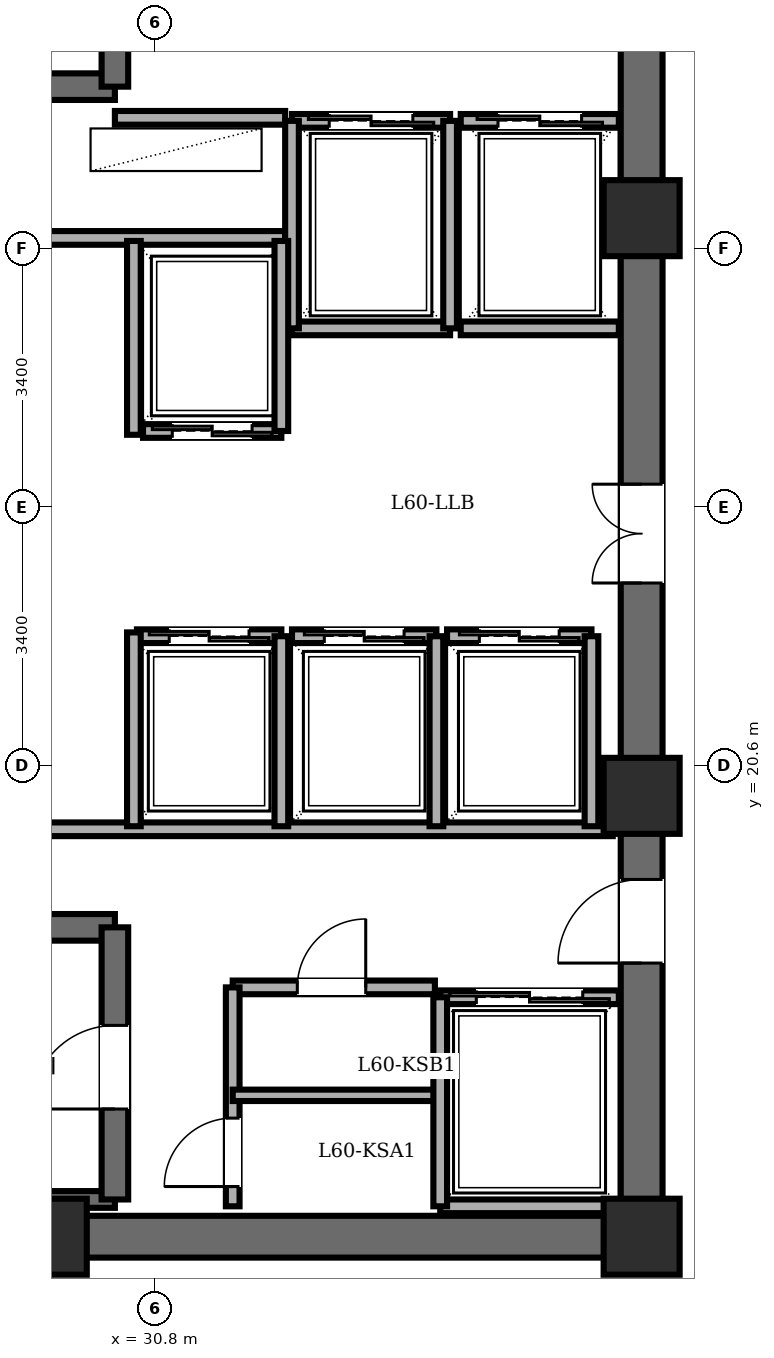
"""IFC4 building model, lengths in metres.
Left out: names, types, materials, properties, quantities, classifications, styles, units other than length and angle.
Written with IfcOpenShell. Run it as: python <this file> out.ifc"""

import sys

from ifc_helpers import new_model, si_unit, direction, frame, frame_2d, origin, origin_2d, place, context, subcontext, project, spatial, rectangle, extrude, element, fill, save


model = new_model("IFC4")
c1 = context("Model", 3, precision=1e-05, world=origin(), true_north=direction((0.0, 1.0)))
c2 = subcontext(c1, "Body", "Model", "MODEL_VIEW")
j1 = project(units=[si_unit("LENGTHUNIT", "METRE"), si_unit("PLANEANGLEUNIT", "RADIAN")], contexts=[c1])
p1 = place(None, origin())
s1 = spatial("IfcSite", under=j1, at=p1, CompositionType="ELEMENT")
p2 = place(p1, origin())
s2 = spatial("IfcBuilding", under=s1, at=p2, CompositionType="ELEMENT")
p3 = place(p2, frame((0.0, 0.0, 230.1)))
s3 = spatial("IfcBuildingStorey", under=s2, at=p3, CompositionType="ELEMENT", Elevation=230.1)
for number, where, z_axis, x_axis in (
    (1, (29.4, 14.4, 0.0), (0.0, 0.0, 1.0), (1.0, 0.0, 0.0)),
    (2, (37.2, 14.4, 0.0), (0.0, 0.0, 1.0), (1.0, 0.0, 0.0)),
    (3, (37.2, 20.2, 0.0), (0.0, 0.0, 1.0), (1.0, 0.0, 0.0)),
    (4, (37.2, 27.8, 0.0), (0.0, 0.0, 1.0), (1.0, 0.0, 0.0)),
):
    element("IfcColumn", number, at=place(p3, frame(where, z_axis=z_axis, x_axis=x_axis)), inside=s3, PredefinedType="COLUMN", context=c2, shape_type="SweptSolid", body=[
        extrude(rectangle(XDim=1.0, YDim=1.0, at=origin_2d()), origin(), (0.0, 0.0, 1.0), 3.6),
    ])
p4 = place(p3, frame((37.2, 14.4, 0.0), z_axis=(0.0, 0.0, 1.0), x_axis=(-1.0, 0.0, 0.0)))
e5 = element("IfcWall", 5, at=p4, inside=s3, PredefinedType="SHEAR", context=c2, shape_type="SweptSolid", body=[
    extrude(rectangle(XDim=15.6, YDim=0.55, at=frame_2d((7.8, 0.0))), origin(), (0.0, 0.0, 1.0), 3.4),
])
p5 = place(p3, frame((37.2, 14.4, 0.0), z_axis=(0.0, 0.0, 1.0), x_axis=(0.0, 1.0, 0.0)))
e6 = element("IfcWall", 6, at=p5, inside=s3, PredefinedType="SHEAR", context=c2, shape_type="SweptSolid", body=[
    extrude(rectangle(XDim=19.2, YDim=0.55, at=frame_2d((9.6, 0.0))), origin(), (0.0, 0.0, 1.0), 3.4),
])
p6 = place(p5, frame((15.8, 0.0, 0.0)))
e7 = element("IfcOpeningElement", 7, at=p6, cuts=e6, PredefinedType="OPENING", context=c2, shape_type="SweptSolid", body=[
    extrude(rectangle(XDim=1.15, YDim=2.15, at=frame_2d((0.575, 1.075))), frame((0.0, 0.285, 0.0), z_axis=(0.0, -1.0, 0.0), x_axis=(1.0, 0.0, 0.0)), (0.0, 0.0, 1.0), 0.57),
])
p7 = place(p5, frame((3.6, 0.0, 0.0)))
e8 = element("IfcOpeningElement", 8, at=p7, cuts=e6, PredefinedType="OPENING", context=c2, shape_type="SweptSolid", body=[
    extrude(rectangle(XDim=1.1, YDim=2.15, at=frame_2d((0.55, 1.075))), frame((0.0, 0.285, 0.0), z_axis=(0.0, -1.0, 0.0), x_axis=(1.0, 0.0, 0.0)), (0.0, 0.0, 1.0), 0.57),
])
p8 = place(p5, frame((8.6, 0.0, 0.0)))
e9 = element("IfcOpeningElement", 9, at=p8, cuts=e6, PredefinedType="OPENING", context=c2, shape_type="SweptSolid", body=[
    extrude(rectangle(XDim=1.3, YDim=2.2, at=frame_2d((0.65, 1.1))), frame((0.0, 0.285, 0.0), z_axis=(0.0, -1.0, 0.0), x_axis=(1.0, 0.0, 0.0)), (0.0, 0.0, 1.0), 0.57),
])
p9 = place(p3, frame((22.48, 29.53, 0.0), z_axis=(0.0, 0.0, 1.0), x_axis=(1.0, 0.0, 0.0)))
e10 = element("IfcWall", 10, at=p9, inside=s3, PredefinedType="SOLIDWALL", context=c2, shape_type="SweptSolid", body=[
    extrude(rectangle(XDim=7.79, YDim=0.35, at=frame_2d((3.895, 0.0))), origin(), (0.0, 0.0, 1.0), 3.4),
])
p10 = place(p3, frame((30.27, 29.53, 0.0), z_axis=(0.0, 0.0, 1.0), x_axis=(0.0, 1.0, 0.0)))
e11 = element("IfcWall", 11, at=p10, inside=s3, PredefinedType="SOLIDWALL", context=c2, shape_type="SweptSolid", body=[
    extrude(rectangle(XDim=3.58, YDim=0.35, at=frame_2d((1.79, 0.0))), origin(), (0.0, 0.0, 1.0), 3.4),
])
p11 = place(p10, frame((1.25, 0.0, 0.0)))
e12 = element("IfcOpeningElement", 12, at=p11, cuts=e11, PredefinedType="OPENING", context=c2, shape_type="SweptSolid", body=[
    extrude(rectangle(XDim=1.1, YDim=2.15, at=frame_2d((0.55, 1.075))), frame((0.0, 0.185, 0.0), z_axis=(0.0, -1.0, 0.0), x_axis=(1.0, 0.0, 0.0)), (0.0, 0.0, 1.0), 0.37),
])
p12 = place(p3, frame((22.48, 18.47, 0.0), z_axis=(0.0, 0.0, 1.0), x_axis=(1.0, 0.0, 0.0)))
e13 = element("IfcWall", 13, at=p12, inside=s3, PredefinedType="SOLIDWALL", context=c2, shape_type="SweptSolid", body=[
    extrude(rectangle(XDim=7.79, YDim=0.35, at=frame_2d((3.895, 0.0))), origin(), (0.0, 0.0, 1.0), 3.4),
])
p13 = place(p3, frame((22.48, 14.89, 0.0), z_axis=(0.0, 0.0, 1.0), x_axis=(1.0, 0.0, 0.0)))
e14 = element("IfcWall", 14, at=p13, inside=s3, PredefinedType="PARTITIONING", context=c2, shape_type="SweptSolid", body=[
    extrude(rectangle(XDim=7.79, YDim=0.22, at=frame_2d((3.895, 0.0))), origin(), (0.0, 0.0, 1.0), 3.4),
])
p14 = place(p3, frame((30.27, 14.89, 0.0), z_axis=(0.0, 0.0, 1.0), x_axis=(0.0, 1.0, 0.0)))
e15 = element("IfcWall", 15, at=p14, inside=s3, PredefinedType="SOLIDWALL", context=c2, shape_type="SweptSolid", body=[
    extrude(rectangle(XDim=3.58, YDim=0.35, at=frame_2d((1.79, 0.0))), origin(), (0.0, 0.0, 1.0), 3.4),
])
p15 = place(p14, frame((1.19, 0.0, 0.0)))
e16 = element("IfcOpeningElement", 16, at=p15, cuts=e15, PredefinedType="OPENING", context=c2, shape_type="SweptSolid", body=[
    extrude(rectangle(XDim=1.1, YDim=2.15, at=frame_2d((0.55, 1.075))), frame((0.0, 0.185, 0.0), z_axis=(0.0, -1.0, 0.0), x_axis=(1.0, 0.0, 0.0)), (0.0, 0.0, 1.0), 0.37),
])
p16 = place(p3, frame((30.27, 29.12, 0.0), z_axis=(0.0, 0.0, 1.0), x_axis=(1.0, 0.0, 0.0)))
e17 = element("IfcWall", 17, at=p16, inside=s3, PredefinedType="PARTITIONING", context=c2, shape_type="SweptSolid", body=[
    extrude(rectangle(XDim=2.24, YDim=0.18, at=frame_2d((1.12, 0.0))), origin(), (0.0, 0.0, 1.0), 3.4),
])
p17 = place(p3, frame((21.95, 27.54, 0.0), z_axis=(0.0, 0.0, 1.0), x_axis=(1.0, 0.0, 0.0)))
e18 = element("IfcWall", 18, at=p17, inside=s3, PredefinedType="PARTITIONING", context=c2, shape_type="SweptSolid", body=[
    extrude(rectangle(XDim=10.56, YDim=0.18, at=frame_2d((5.28, 0.0))), origin(), (0.0, 0.0, 1.0), 3.4),
])
p18 = place(p3, frame((21.95, 19.76, 0.0), z_axis=(0.0, 0.0, 1.0), x_axis=(1.0, 0.0, 0.0)))
e19 = element("IfcWall", 19, at=p18, inside=s3, PredefinedType="PARTITIONING", context=c2, shape_type="SweptSolid", body=[
    extrude(rectangle(XDim=14.87, YDim=0.18, at=frame_2d((7.435, 0.0))), origin(), (0.0, 0.0, 1.0), 3.4),
])
p19 = place(p3, frame((31.82, 17.68, 0.0), z_axis=(0.0, 0.0, 1.0), x_axis=(1.0, 0.0, 0.0)))
e20 = element("IfcWall", 20, at=p19, inside=s3, PredefinedType="PARTITIONING", context=c2, shape_type="SweptSolid", body=[
    extrude(rectangle(XDim=2.66, YDim=0.18, at=frame_2d((1.33, 0.0))), origin(), (0.0, 0.0, 1.0), 3.4),
])
p20 = place(p19, frame((0.85, 0.0, 0.0)))
e21 = element("IfcOpeningElement", 21, at=p20, cuts=e20, PredefinedType="OPENING", context=c2, shape_type="SweptSolid", body=[
    extrude(rectangle(XDim=0.9, YDim=2.05, at=frame_2d((0.45, 1.025))), frame((0.0, 0.1, 0.0), z_axis=(0.0, -1.0, 0.0), x_axis=(1.0, 0.0, 0.0)), (0.0, 0.0, 1.0), 0.2),
])
p21 = place(p3, frame((31.82, 14.8, 0.0), z_axis=(0.0, 0.0, 1.0), x_axis=(0.0, 1.0, 0.0)))
e22 = element("IfcWall", 22, at=p21, inside=s3, PredefinedType="PARTITIONING", context=c2, shape_type="SweptSolid", body=[
    extrude(rectangle(XDim=2.88, YDim=0.18, at=frame_2d((1.44, 0.0))), origin(), (0.0, 0.0, 1.0), 3.4),
])
p22 = place(p21, frame((0.26, 0.0, 0.0)))
e23 = element("IfcOpeningElement", 23, at=p22, cuts=e22, PredefinedType="OPENING", context=c2, shape_type="SweptSolid", body=[
    extrude(rectangle(XDim=0.9, YDim=2.05, at=frame_2d((0.45, 1.025))), frame((0.0, 0.1, 0.0), z_axis=(0.0, -1.0, 0.0), x_axis=(1.0, 0.0, 0.0)), (0.0, 0.0, 1.0), 0.2),
])
p23 = place(p3, frame((31.82, 16.26, 0.0), z_axis=(0.0, 0.0, 1.0), x_axis=(1.0, 0.0, 0.0)))
e24 = element("IfcWall", 24, at=p23, inside=s3, PredefinedType="PARTITIONING", context=c2, shape_type="SweptSolid", body=[
    extrude(rectangle(XDim=2.66, YDim=0.15, at=frame_2d((1.33, 0.0))), origin(), (0.0, 0.0, 1.0), 3.4),
])
p24 = place(p3, frame((32.6, 29.08, 0.0), z_axis=(0.0, 0.0, 1.0), x_axis=(1.0, 0.0, 0.0)))
e25 = element("IfcWall", 25, at=p24, inside=s3, PredefinedType="PARTITIONING", context=c2, shape_type="SweptSolid", body=[
    extrude(rectangle(XDim=2.08, YDim=0.18, at=frame_2d((1.04, 0.0))), origin(), (0.0, 0.0, 1.0), 3.4),
])
p25 = place(p24, frame((0.49, 0.0, 0.0)))
e26 = element("IfcOpeningElement", 26, at=p25, cuts=e25, PredefinedType="OPENING", context=c2, shape_type="SweptSolid", body=[
    extrude(rectangle(XDim=1.1, YDim=2.2, at=frame_2d((0.55, 1.1))), frame((0.0, 0.1, 0.0), z_axis=(0.0, -1.0, 0.0), x_axis=(1.0, 0.0, 0.0)), (0.0, 0.0, 1.0), 0.2),
])
p26 = place(p3, frame((34.68, 26.35, 0.0), z_axis=(0.0, 0.0, 1.0), x_axis=(-1.0, 0.0, 0.0)))
e27 = element("IfcWall", 27, at=p26, inside=s3, PredefinedType="PARTITIONING", context=c2, shape_type="SweptSolid", body=[
    extrude(rectangle(XDim=2.08, YDim=0.18, at=frame_2d((1.04, 0.0))), origin(), (0.0, 0.0, 1.0), 3.4),
])
for number, where, z_axis, x_axis in (
    (28, (34.68, 26.35, 0.0), (0.0, 0.0, 1.0), (0.0, 1.0, 0.0)),
    (29, (32.6, 29.08, 0.0), (0.0, 0.0, 1.0), (0.0, -1.0, 0.0)),
):
    element("IfcWall", number, at=place(p3, frame(where, z_axis=z_axis, x_axis=x_axis)), inside=s3, PredefinedType="PARTITIONING", context=c2, shape_type="SweptSolid", body=[
        extrude(rectangle(XDim=2.73, YDim=0.18, at=frame_2d((1.365, 0.0))), origin(), (0.0, 0.0, 1.0), 3.4),
    ])
p27 = place(p3, frame((34.82, 29.08, 0.0), z_axis=(0.0, 0.0, 1.0), x_axis=(1.0, 0.0, 0.0)))
e30 = element("IfcWall", 30, at=p27, inside=s3, PredefinedType="PARTITIONING", context=c2, shape_type="SweptSolid", body=[
    extrude(rectangle(XDim=2.08, YDim=0.18, at=frame_2d((1.04, 0.0))), origin(), (0.0, 0.0, 1.0), 3.4),
])
p28 = place(p27, frame((0.49, 0.0, 0.0)))
e31 = element("IfcOpeningElement", 31, at=p28, cuts=e30, PredefinedType="OPENING", context=c2, shape_type="SweptSolid", body=[
    extrude(rectangle(XDim=1.1, YDim=2.2, at=frame_2d((0.55, 1.1))), frame((0.0, 0.1, 0.0), z_axis=(0.0, -1.0, 0.0), x_axis=(1.0, 0.0, 0.0)), (0.0, 0.0, 1.0), 0.2),
])
p29 = place(p3, frame((36.9, 26.35, 0.0), z_axis=(0.0, 0.0, 1.0), x_axis=(-1.0, 0.0, 0.0)))
e32 = element("IfcWall", 32, at=p29, inside=s3, PredefinedType="PARTITIONING", context=c2, shape_type="SweptSolid", body=[
    extrude(rectangle(XDim=2.08, YDim=0.18, at=frame_2d((1.04, 0.0))), origin(), (0.0, 0.0, 1.0), 3.4),
])
p30 = place(p3, frame((34.55, 17.55, 0.0), z_axis=(0.0, 0.0, 1.0), x_axis=(1.0, 0.0, 0.0)))
e33 = element("IfcWall", 33, at=p30, inside=s3, PredefinedType="PARTITIONING", context=c2, shape_type="SweptSolid", body=[
    extrude(rectangle(XDim=2.35, YDim=0.18, at=frame_2d((1.175, 0.0))), origin(), (0.0, 0.0, 1.0), 3.4),
])
p31 = place(p30, frame((0.475, 0.0, 0.0)))
e34 = element("IfcOpeningElement", 34, at=p31, cuts=e33, PredefinedType="OPENING", context=c2, shape_type="SweptSolid", body=[
    extrude(rectangle(XDim=1.4, YDim=2.3, at=frame_2d((0.7, 1.15))), frame((0.0, 0.1, 0.0), z_axis=(0.0, -1.0, 0.0), x_axis=(1.0, 0.0, 0.0)), (0.0, 0.0, 1.0), 0.2),
])
p32 = place(p3, frame((36.9, 14.8, 0.0), z_axis=(0.0, 0.0, 1.0), x_axis=(-1.0, 0.0, 0.0)))
e35 = element("IfcWall", 35, at=p32, inside=s3, PredefinedType="PARTITIONING", context=c2, shape_type="SweptSolid", body=[
    extrude(rectangle(XDim=2.35, YDim=0.18, at=frame_2d((1.175, 0.0))), origin(), (0.0, 0.0, 1.0), 3.4),
])
p33 = place(p3, frame((34.55, 17.55, 0.0), z_axis=(0.0, 0.0, 1.0), x_axis=(0.0, -1.0, 0.0)))
e36 = element("IfcWall", 36, at=p33, inside=s3, PredefinedType="PARTITIONING", context=c2, shape_type="SweptSolid", body=[
    extrude(rectangle(XDim=2.75, YDim=0.18, at=frame_2d((1.375, 0.0))), origin(), (0.0, 0.0, 1.0), 3.4),
])
p34 = place(p3, frame((32.46, 25.0, 0.0), z_axis=(0.0, 0.0, 1.0), x_axis=(-1.0, 0.0, 0.0)))
e37 = element("IfcWall", 37, at=p34, inside=s3, PredefinedType="PARTITIONING", context=c2, shape_type="SweptSolid", body=[
    extrude(rectangle(XDim=1.82, YDim=0.18, at=frame_2d((0.91, 0.0))), origin(), (0.0, 0.0, 1.0), 3.4),
])
p35 = place(p34, frame((0.385, 0.0, 0.0)))
e38 = element("IfcOpeningElement", 38, at=p35, cuts=e37, PredefinedType="OPENING", context=c2, shape_type="SweptSolid", body=[
    extrude(rectangle(XDim=1.05, YDim=2.2, at=frame_2d((0.525, 1.1))), frame((0.0, 0.1, 0.0), z_axis=(0.0, -1.0, 0.0), x_axis=(1.0, 0.0, 0.0)), (0.0, 0.0, 1.0), 0.2),
])
p36 = place(p3, frame((32.46, 25.0, 0.0), z_axis=(0.0, 0.0, 1.0), x_axis=(0.0, 1.0, 0.0)))
e39 = element("IfcWall", 39, at=p36, inside=s3, PredefinedType="PARTITIONING", context=c2, shape_type="SweptSolid", body=[
    extrude(rectangle(XDim=2.5, YDim=0.18, at=frame_2d((1.25, 0.0))), origin(), (0.0, 0.0, 1.0), 3.4),
])
p37 = place(p3, frame((30.56, 22.3, 0.0), z_axis=(0.0, 0.0, 1.0), x_axis=(1.0, 0.0, 0.0)))
e40 = element("IfcWall", 40, at=p37, inside=s3, PredefinedType="PARTITIONING", context=c2, shape_type="SweptSolid", body=[
    extrude(rectangle(XDim=1.9, YDim=0.18, at=frame_2d((0.95, 0.0))), origin(), (0.0, 0.0, 1.0), 3.4),
])
p38 = place(p37, frame((0.425, 0.0, 0.0)))
e41 = element("IfcOpeningElement", 41, at=p38, cuts=e40, PredefinedType="OPENING", context=c2, shape_type="SweptSolid", body=[
    extrude(rectangle(XDim=1.05, YDim=2.2, at=frame_2d((0.525, 1.1))), frame((0.0, 0.1, 0.0), z_axis=(0.0, -1.0, 0.0), x_axis=(1.0, 0.0, 0.0)), (0.0, 0.0, 1.0), 0.2),
])
p39 = place(p3, frame((32.46, 19.8, 0.0), z_axis=(0.0, 0.0, 1.0), x_axis=(0.0, 1.0, 0.0)))
e42 = element("IfcWall", 42, at=p39, inside=s3, PredefinedType="PARTITIONING", context=c2, shape_type="SweptSolid", body=[
    extrude(rectangle(XDim=2.5, YDim=0.18, at=frame_2d((1.25, 0.0))), origin(), (0.0, 0.0, 1.0), 3.4),
])
p40 = place(p3, frame((32.6, 22.3, 0.0), z_axis=(0.0, 0.0, 1.0), x_axis=(1.0, 0.0, 0.0)))
e43 = element("IfcWall", 43, at=p40, inside=s3, PredefinedType="PARTITIONING", context=c2, shape_type="SweptSolid", body=[
    extrude(rectangle(XDim=1.9, YDim=0.18, at=frame_2d((0.95, 0.0))), origin(), (0.0, 0.0, 1.0), 3.4),
])
p41 = place(p40, frame((0.425, 0.0, 0.0)))
e44 = element("IfcOpeningElement", 44, at=p41, cuts=e43, PredefinedType="OPENING", context=c2, shape_type="SweptSolid", body=[
    extrude(rectangle(XDim=1.05, YDim=2.2, at=frame_2d((0.525, 1.1))), frame((0.0, 0.1, 0.0), z_axis=(0.0, -1.0, 0.0), x_axis=(1.0, 0.0, 0.0)), (0.0, 0.0, 1.0), 0.2),
])
p42 = place(p3, frame((34.5, 19.8, 0.0), z_axis=(0.0, 0.0, 1.0), x_axis=(0.0, 1.0, 0.0)))
e45 = element("IfcWall", 45, at=p42, inside=s3, PredefinedType="PARTITIONING", context=c2, shape_type="SweptSolid", body=[
    extrude(rectangle(XDim=2.5, YDim=0.18, at=frame_2d((1.25, 0.0))), origin(), (0.0, 0.0, 1.0), 3.4),
])
p43 = place(p3, frame((34.64, 22.3, 0.0), z_axis=(0.0, 0.0, 1.0), x_axis=(1.0, 0.0, 0.0)))
e46 = element("IfcWall", 46, at=p43, inside=s3, PredefinedType="PARTITIONING", context=c2, shape_type="SweptSolid", body=[
    extrude(rectangle(XDim=1.9, YDim=0.18, at=frame_2d((0.95, 0.0))), origin(), (0.0, 0.0, 1.0), 3.4),
])
p44 = place(p43, frame((0.425, 0.0, 0.0)))
e47 = element("IfcOpeningElement", 47, at=p44, cuts=e46, PredefinedType="OPENING", context=c2, shape_type="SweptSolid", body=[
    extrude(rectangle(XDim=1.05, YDim=2.2, at=frame_2d((0.525, 1.1))), frame((0.0, 0.1, 0.0), z_axis=(0.0, -1.0, 0.0), x_axis=(1.0, 0.0, 0.0)), (0.0, 0.0, 1.0), 0.2),
])
p45 = place(p3, frame((36.54, 19.8, 0.0), z_axis=(0.0, 0.0, 1.0), x_axis=(0.0, 1.0, 0.0)))
e48 = element("IfcWall", 48, at=p45, inside=s3, PredefinedType="PARTITIONING", context=c2, shape_type="SweptSolid", body=[
    extrude(rectangle(XDim=2.5, YDim=0.18, at=frame_2d((1.25, 0.0))), origin(), (0.0, 0.0, 1.0), 3.4),
])
for number, where, z_axis, x_axis in (
    (49, (30.52, 24.95, 0.0), (0.0, 0.0, 1.0), (0.0, 1.0, 0.0)),
    (50, (30.52, 19.8, 0.0), (0.0, 0.0, 1.0), (0.0, 1.0, 0.0)),
):
    element("IfcWall", number, at=place(p3, frame(where, z_axis=z_axis, x_axis=x_axis)), inside=s3, PredefinedType="PARTITIONING", context=c2, shape_type="SweptSolid", body=[
        extrude(rectangle(XDim=2.55, YDim=0.18, at=frame_2d((1.275, 0.0))), origin(), (0.0, 0.0, 1.0), 3.4),
    ])
p46 = place(p15, origin())
e51 = element("IfcDoor", 51, at=p46, inside=s3, OperationType="SINGLE_SWING_LEFT", PredefinedType="DOOR", context=c2, shape_type="SweptSolid", body=[
    extrude(rectangle(XDim=1.1, YDim=2.15, at=frame_2d((0.55, 1.075))), frame((0.0, 0.025, 0.0), z_axis=(0.0, -1.0, 0.0), x_axis=(1.0, 0.0, 0.0)), (0.0, 0.0, 1.0), 0.05),
])
fill(e16, e51)
p47 = place(p7, origin())
e52 = element("IfcDoor", 52, at=p47, inside=s3, OperationType="SINGLE_SWING_LEFT", PredefinedType="DOOR", context=c2, shape_type="SweptSolid", body=[
    extrude(rectangle(XDim=1.1, YDim=2.15, at=frame_2d((0.55, 1.075))), frame((0.0, 0.025, 0.0), z_axis=(0.0, -1.0, 0.0), x_axis=(1.0, 0.0, 0.0)), (0.0, 0.0, 1.0), 0.05),
])
fill(e8, e52)
p48 = place(p20, origin())
e53 = element("IfcDoor", 53, at=p48, inside=s3, OperationType="SINGLE_SWING_RIGHT", PredefinedType="DOOR", context=c2, shape_type="SweptSolid", body=[
    extrude(rectangle(XDim=0.9, YDim=2.05, at=frame_2d((0.45, 1.025))), frame((0.0, 0.025, 0.0), z_axis=(0.0, -1.0, 0.0), x_axis=(1.0, 0.0, 0.0)), (0.0, 0.0, 1.0), 0.05),
])
fill(e21, e53)
p49 = place(p22, origin())
e54 = element("IfcDoor", 54, at=p49, inside=s3, OperationType="SINGLE_SWING_LEFT", PredefinedType="DOOR", context=c2, shape_type="SweptSolid", body=[
    extrude(rectangle(XDim=0.9, YDim=2.05, at=frame_2d((0.45, 1.025))), frame((0.0, 0.025, 0.0), z_axis=(0.0, -1.0, 0.0), x_axis=(1.0, 0.0, 0.0)), (0.0, 0.0, 1.0), 0.05),
])
fill(e23, e54)
p50 = place(p25, origin())
e55 = element("IfcDoor", 55, at=p50, inside=s3, OperationType="DOUBLE_DOOR_SLIDING", PredefinedType="DOOR", context=c2, shape_type="SweptSolid", body=[
    extrude(rectangle(XDim=1.1, YDim=2.2, at=frame_2d((0.55, 1.1))), frame((0.0, 0.025, 0.0), z_axis=(0.0, -1.0, 0.0), x_axis=(1.0, 0.0, 0.0)), (0.0, 0.0, 1.0), 0.05),
])
fill(e26, e55)
p51 = place(p28, origin())
e56 = element("IfcDoor", 56, at=p51, inside=s3, OperationType="DOUBLE_DOOR_SLIDING", PredefinedType="DOOR", context=c2, shape_type="SweptSolid", body=[
    extrude(rectangle(XDim=1.1, YDim=2.2, at=frame_2d((0.55, 1.1))), frame((0.0, 0.025, 0.0), z_axis=(0.0, -1.0, 0.0), x_axis=(1.0, 0.0, 0.0)), (0.0, 0.0, 1.0), 0.05),
])
fill(e31, e56)
p52 = place(p31, origin())
e57 = element("IfcDoor", 57, at=p52, inside=s3, OperationType="DOUBLE_DOOR_SLIDING", PredefinedType="DOOR", context=c2, shape_type="SweptSolid", body=[
    extrude(rectangle(XDim=1.4, YDim=2.3, at=frame_2d((0.7, 1.15))), frame((0.0, 0.025, 0.0), z_axis=(0.0, -1.0, 0.0), x_axis=(1.0, 0.0, 0.0)), (0.0, 0.0, 1.0), 0.05),
])
fill(e34, e57)
p53 = place(p35, origin())
e58 = element("IfcDoor", 58, at=p53, inside=s3, OperationType="DOUBLE_DOOR_SLIDING", PredefinedType="DOOR", context=c2, shape_type="SweptSolid", body=[
    extrude(rectangle(XDim=1.05, YDim=2.2, at=frame_2d((0.525, 1.1))), frame((0.0, 0.025, 0.0), z_axis=(0.0, -1.0, 0.0), x_axis=(1.0, 0.0, 0.0)), (0.0, 0.0, 1.0), 0.05),
])
fill(e38, e58)
p54 = place(p38, origin())
e59 = element("IfcDoor", 59, at=p54, inside=s3, OperationType="DOUBLE_DOOR_SLIDING", PredefinedType="DOOR", context=c2, shape_type="SweptSolid", body=[
    extrude(rectangle(XDim=1.05, YDim=2.2, at=frame_2d((0.525, 1.1))), frame((0.0, 0.025, 0.0), z_axis=(0.0, -1.0, 0.0), x_axis=(1.0, 0.0, 0.0)), (0.0, 0.0, 1.0), 0.05),
])
fill(e41, e59)
p55 = place(p41, origin())
e60 = element("IfcDoor", 60, at=p55, inside=s3, OperationType="DOUBLE_DOOR_SLIDING", PredefinedType="DOOR", context=c2, shape_type="SweptSolid", body=[
    extrude(rectangle(XDim=1.05, YDim=2.2, at=frame_2d((0.525, 1.1))), frame((0.0, 0.025, 0.0), z_axis=(0.0, -1.0, 0.0), x_axis=(1.0, 0.0, 0.0)), (0.0, 0.0, 1.0), 0.05),
])
fill(e44, e60)
p56 = place(p44, origin())
e61 = element("IfcDoor", 61, at=p56, inside=s3, OperationType="DOUBLE_DOOR_SLIDING", PredefinedType="DOOR", context=c2, shape_type="SweptSolid", body=[
    extrude(rectangle(XDim=1.05, YDim=2.2, at=frame_2d((0.525, 1.1))), frame((0.0, 0.025, 0.0), z_axis=(0.0, -1.0, 0.0), x_axis=(1.0, 0.0, 0.0)), (0.0, 0.0, 1.0), 0.05),
])
fill(e47, e61)
p57 = place(p8, origin())
e62 = element("IfcDoor", 62, at=p57, inside=s3, OperationType="DOUBLE_DOOR_SINGLE_SWING", PredefinedType="DOOR", context=c2, shape_type="SweptSolid", body=[
    extrude(rectangle(XDim=1.3, YDim=2.2, at=frame_2d((0.65, 1.1))), frame((0.0, 0.025, 0.0), z_axis=(0.0, -1.0, 0.0), x_axis=(1.0, 0.0, 0.0)), (0.0, 0.0, 1.0), 0.05),
])
fill(e9, e62)
save(model, sys.argv[1])
